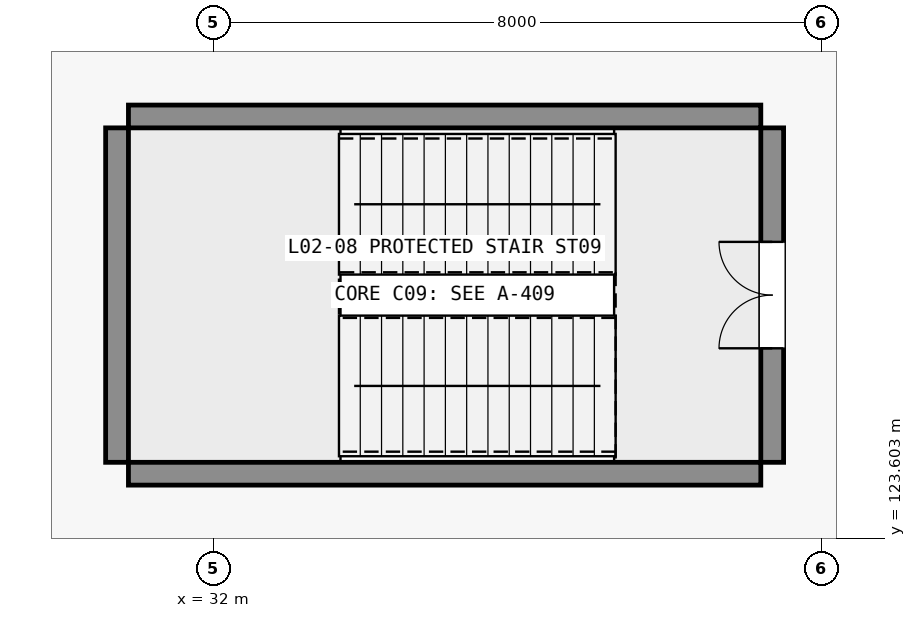
"""IFC4 building model, lengths in metres.
Left out: names, types, materials, properties, quantities, classifications, styles, units other than length and angle.
Written with IfcOpenShell. Run it as: python <this file> out.ifc"""

import sys

from ifc_helpers import new_model, si_unit, direction, frame, frame_2d, origin, place, context, subcontext, project, spatial, rectangle, extrude, element, fill, save


model = new_model("IFC4")
c1 = context("Model", 3, precision=1e-05, world=origin(), true_north=direction((0.0, 1.0)))
c2 = subcontext(c1, "Body", "Model", "MODEL_VIEW")
j1 = project(units=[si_unit("LENGTHUNIT", "METRE"), si_unit("PLANEANGLEUNIT", "RADIAN")], contexts=[c1])
p1 = place(None, origin())
s1 = spatial("IfcSite", under=j1, at=p1, CompositionType="ELEMENT")
p2 = place(p1, origin())
s2 = spatial("IfcBuilding", under=s1, at=p2, CompositionType="ELEMENT")
p3 = place(p2, frame((0.0, 0.0, 11.4)))
s3 = spatial("IfcBuildingStorey", under=s2, at=p3, CompositionType="ELEMENT", Elevation=11.4)
for number, where, z_axis, x_axis in (
    (1, (30.88, 124.45, 0.0), (0.0, 0.0, 1.0), (1.0, 0.0, 0.0)),
    (2, (30.88, 129.15, 0.0), (0.0, 0.0, 1.0), (1.0, 0.0, 0.0)),
):
    element("IfcWall", number, at=place(p3, frame(where, z_axis=z_axis, x_axis=x_axis)), inside=s3, PredefinedType="SHEAR", context=c2, shape_type="SweptSolid", body=[
        extrude(rectangle(XDim=8.32, YDim=0.3, at=frame_2d((4.16, 0.0))), origin(), (0.0, 0.0, 1.0), 4.8),
    ])
p4 = place(p3, frame((30.73, 124.6, 0.0), z_axis=(0.0, 0.0, 1.0), x_axis=(0.0, 1.0, 0.0)))
e3 = element("IfcWall", 3, at=p4, inside=s3, PredefinedType="SHEAR", context=c2, shape_type="SweptSolid", body=[
    extrude(rectangle(XDim=4.4, YDim=0.3, at=frame_2d((2.2, 0.0))), origin(), (0.0, 0.0, 1.0), 4.8),
])
p5 = place(p3, frame((39.35, 124.6, 0.0), z_axis=(0.0, 0.0, 1.0), x_axis=(0.0, 1.0, 0.0)))
e4 = element("IfcWall", 4, at=p5, inside=s3, PredefinedType="SHEAR", context=c2, shape_type="SweptSolid", body=[
    extrude(rectangle(XDim=4.4, YDim=0.3, at=frame_2d((2.2, 0.0))), origin(), (0.0, 0.0, 1.0), 4.8),
])
p6 = place(p5, frame((1.5, 0.0, 0.0)))
e5 = element("IfcOpeningElement", 5, at=p6, cuts=e4, PredefinedType="OPENING", context=c2, shape_type="SweptSolid", body=[
    extrude(rectangle(XDim=1.4, YDim=2.2, at=frame_2d((0.7, 1.1))), frame((0.0, 0.16, 0.0), z_axis=(0.0, -1.0, 0.0), x_axis=(1.0, 0.0, 0.0)), (0.0, 0.0, 1.0), 0.32),
])
p7 = place(p6, origin())
e6 = element("IfcDoor", 6, at=p7, inside=s3, OperationType="DOUBLE_DOOR_SINGLE_SWING", PredefinedType="DOOR", context=c2, shape_type="SweptSolid", body=[
    extrude(rectangle(XDim=1.4, YDim=2.2, at=frame_2d((0.7, 1.1))), frame((0.0, 0.025, 0.0), z_axis=(0.0, -1.0, 0.0), x_axis=(1.0, 0.0, 0.0)), (0.0, 0.0, 1.0), 0.05),
])
fill(e5, e6)
save(model, sys.argv[1])
